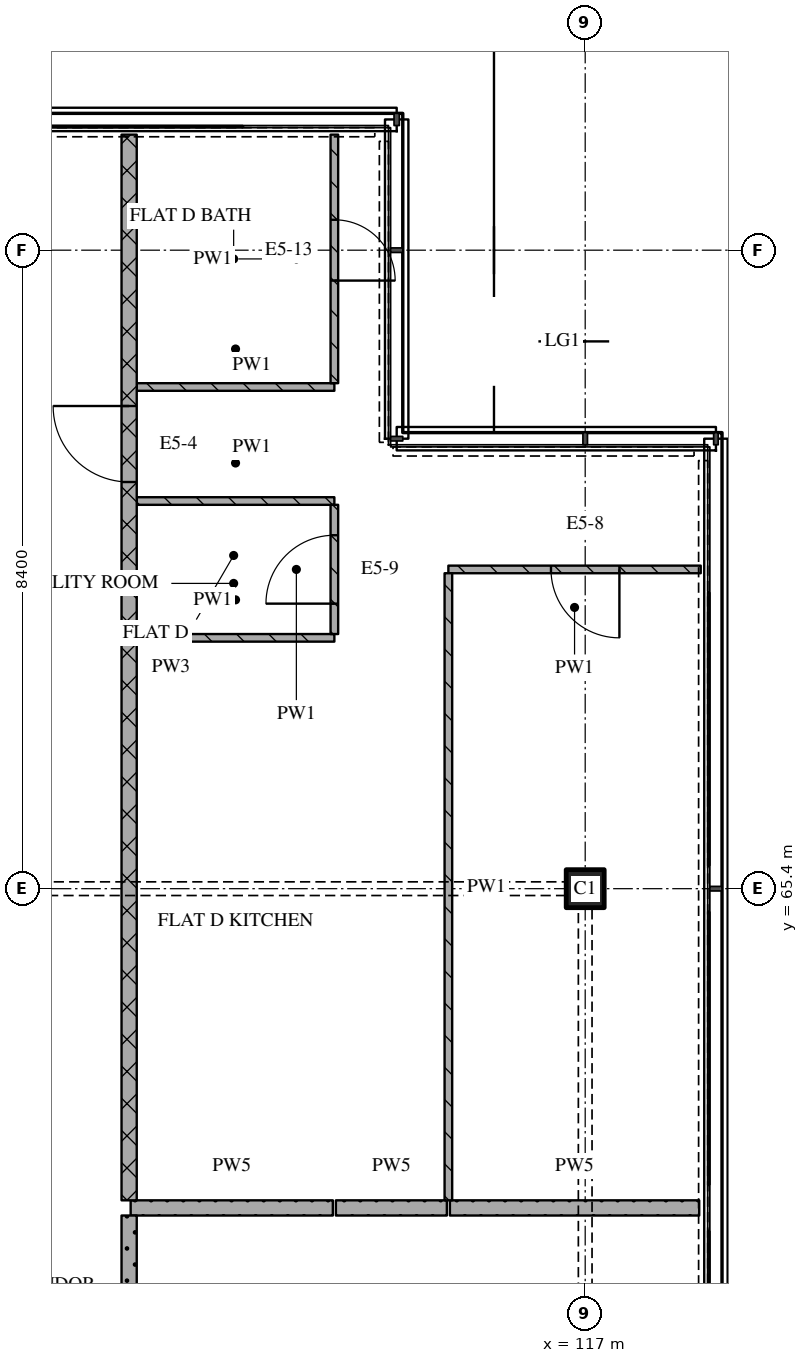
"""IFC4 building model, lengths in metres.
Left out: names, types, materials, properties, quantities, classifications, styles, units other than length and angle.
Written with IfcOpenShell. Run it as: python <this file> out.ifc"""

import sys

from ifc_helpers import new_model, si_unit, direction, frame, frame_2d, origin, origin_2d, place, context, subcontext, project, spatial, rectangle, extrude, element, fill, save


model = new_model("IFC4")
c1 = context("Model", 3, precision=1e-05, world=origin(), true_north=direction((0.0, 1.0)))
c2 = subcontext(c1, "Body", "Model", "MODEL_VIEW")
j1 = project(units=[si_unit("LENGTHUNIT", "METRE"), si_unit("PLANEANGLEUNIT", "RADIAN")], contexts=[c1])
p1 = place(None, origin())
s1 = spatial("IfcSite", under=j1, at=p1, CompositionType="ELEMENT")
p2 = place(p1, origin())
s2 = spatial("IfcBuilding", under=s1, at=p2, CompositionType="ELEMENT")
p3 = place(p2, frame((0.0, 0.0, 295.95)))
s3 = spatial("IfcBuildingStorey", under=s2, at=p3, CompositionType="ELEMENT", Elevation=295.95)
p4 = place(p3, frame((117.0, 65.4, 0.0), z_axis=(0.0, 0.0, 1.0), x_axis=(1.0, 0.0, 0.0)))
e1 = element("IfcColumn", 1, at=p4, inside=s3, PredefinedType="COLUMN", context=c2, shape_type="SweptSolid", body=[
    extrude(rectangle(XDim=0.5, YDim=0.5, at=origin_2d()), origin(), (0.0, 0.0, 1.0), 3.6),
])
p5 = place(p3, frame((111.02, 61.2, 0.0), z_axis=(0.0, 0.0, 1.0), x_axis=(1.0, 0.0, 0.0)))
e2 = element("IfcWall", 2, at=p5, inside=s3, PredefinedType="PARTITIONING", context=c2, shape_type="SweptSolid", body=[
    extrude(rectangle(XDim=2.66, YDim=0.2, at=frame_2d((1.33, 0.0))), origin(), (0.0, 0.0, 1.0), 3.32),
])
p6 = place(p3, frame((113.72, 61.2, 0.0), z_axis=(0.0, 0.0, 1.0), x_axis=(1.0, 0.0, 0.0)))
e3 = element("IfcWall", 3, at=p6, inside=s3, PredefinedType="PARTITIONING", context=c2, shape_type="SweptSolid", body=[
    extrude(rectangle(XDim=1.46, YDim=0.2, at=frame_2d((0.73, 0.0))), origin(), (0.0, 0.0, 1.0), 3.32),
])
p7 = place(p3, frame((115.22, 61.2, 0.0), z_axis=(0.0, 0.0, 1.0), x_axis=(1.0, 0.0, 0.0)))
e4 = element("IfcWall", 4, at=p7, inside=s3, PredefinedType="PARTITIONING", context=c2, shape_type="SweptSolid", body=[
    extrude(rectangle(XDim=3.28, YDim=0.2, at=frame_2d((1.64, 0.0))), origin(), (0.0, 0.0, 1.0), 3.32),
])
p8 = place(p3, frame((111.1, 68.7, 0.0), z_axis=(0.0, 0.0, 1.0), x_axis=(1.0, 0.0, 0.0)))
e5 = element("IfcWall", 5, at=p8, inside=s3, PredefinedType="PARTITIONING", context=c2, shape_type="SweptSolid", body=[
    extrude(rectangle(XDim=2.6, YDim=0.1, at=frame_2d((1.3, 0.0))), origin(), (0.0, 0.0, 1.0), 3.32),
])
p9 = place(p3, frame((118.52, 69.6, 0.0), z_axis=(0.0, 0.0, 1.0), x_axis=(-1.0, 0.0, 0.0)))
e6 = element("IfcWall", 6, at=p9, inside=s3, PredefinedType="PARTITIONING", context=c2, shape_type="SweptSolid", body=[
    extrude(rectangle(XDim=3.32, YDim=0.1, at=frame_2d((1.66, 0.0))), origin(), (0.0, 0.0, 1.0), 3.32),
])
p10 = place(p9, frame((1.07, 0.0, 0.0)))
e7 = element("IfcOpeningElement", 7, at=p10, cuts=e6, PredefinedType="OPENING", context=c2, shape_type="SweptSolid", body=[
    extrude(rectangle(XDim=0.9, YDim=2.1, at=frame_2d((0.45, 1.05))), frame((0.0, 0.06, 0.0), z_axis=(0.0, -1.0, 0.0), x_axis=(1.0, 0.0, 0.0)), (0.0, 0.0, 1.0), 0.12),
])
for number, where, z_axis, x_axis in (
    (8, (111.1, 70.5, 0.0), (0.0, 0.0, 1.0), (1.0, 0.0, 0.0)),
    (9, (111.1, 72.0, 0.0), (0.0, 0.0, 1.0), (1.0, 0.0, 0.0)),
):
    element("IfcWall", number, at=place(p3, frame(where, z_axis=z_axis, x_axis=x_axis)), inside=s3, PredefinedType="PARTITIONING", context=c2, shape_type="SweptSolid", body=[
        extrude(rectangle(XDim=2.6, YDim=0.1, at=frame_2d((1.3, 0.0))), origin(), (0.0, 0.0, 1.0), 3.32),
    ])
p11 = place(p3, frame((111.0, 75.32, 0.0), z_axis=(0.0, 0.0, 1.0), x_axis=(0.0, -1.0, 0.0)))
e10 = element("IfcWall", 10, at=p11, inside=s3, PredefinedType="PARTITIONING", context=c2, shape_type="SweptSolid", body=[
    extrude(rectangle(XDim=14.02, YDim=0.2, at=frame_2d((7.01, 0.0))), origin(), (0.0, 0.0, 1.0), 3.32),
])
p12 = place(p11, frame((3.57, 0.0, 0.0)))
e11 = element("IfcOpeningElement", 11, at=p12, cuts=e10, PredefinedType="OPENING", context=c2, shape_type="SweptSolid", body=[
    extrude(rectangle(XDim=1.0, YDim=2.1, at=frame_2d((0.5, 1.05))), frame((0.0, 0.11, 0.0), z_axis=(0.0, -1.0, 0.0), x_axis=(1.0, 0.0, 0.0)), (0.0, 0.0, 1.0), 0.22),
])
p13 = place(p3, frame((111.0, 61.1, 0.0), z_axis=(0.0, 0.0, 1.0), x_axis=(0.0, -1.0, 0.0)))
e12 = element("IfcWall", 12, at=p13, inside=s3, PredefinedType="PARTITIONING", context=c2, shape_type="SweptSolid", body=[
    extrude(rectangle(XDim=2.2, YDim=0.2, at=frame_2d((1.1, 0.0))), origin(), (0.0, 0.0, 1.0), 3.32),
])
p14 = place(p3, frame((113.7, 68.75, 0.0), z_axis=(0.0, 0.0, 1.0), x_axis=(0.0, 1.0, 0.0)))
e13 = element("IfcWall", 13, at=p14, inside=s3, PredefinedType="PARTITIONING", context=c2, shape_type="SweptSolid", body=[
    extrude(rectangle(XDim=1.7, YDim=0.1, at=frame_2d((0.85, 0.0))), origin(), (0.0, 0.0, 1.0), 3.32),
])
p15 = place(p14, frame((0.4, 0.0, 0.0)))
e14 = element("IfcOpeningElement", 14, at=p15, cuts=e13, PredefinedType="OPENING", context=c2, shape_type="SweptSolid", body=[
    extrude(rectangle(XDim=0.9, YDim=2.1, at=frame_2d((0.45, 1.05))), frame((0.0, 0.06, 0.0), z_axis=(0.0, -1.0, 0.0), x_axis=(1.0, 0.0, 0.0)), (0.0, 0.0, 1.0), 0.12),
])
p16 = place(p3, frame((113.7, 72.05, 0.0), z_axis=(0.0, 0.0, 1.0), x_axis=(0.0, 1.0, 0.0)))
e15 = element("IfcWall", 15, at=p16, inside=s3, PredefinedType="PARTITIONING", context=c2, shape_type="SweptSolid", body=[
    extrude(rectangle(XDim=3.27, YDim=0.1, at=frame_2d((1.635, 0.0))), origin(), (0.0, 0.0, 1.0), 3.32),
])
p17 = place(p16, frame((1.35, 0.0, 0.0)))
e16 = element("IfcOpeningElement", 16, at=p17, cuts=e15, PredefinedType="OPENING", context=c2, shape_type="SweptSolid", body=[
    extrude(rectangle(XDim=0.8, YDim=2.1, at=frame_2d((0.4, 1.05))), frame((0.0, 0.06, 0.0), z_axis=(0.0, -1.0, 0.0), x_axis=(1.0, 0.0, 0.0)), (0.0, 0.0, 1.0), 0.12),
])
p18 = place(p3, frame((115.2, 69.55, 0.0), z_axis=(0.0, 0.0, 1.0), x_axis=(0.0, -1.0, 0.0)))
e17 = element("IfcWall", 17, at=p18, inside=s3, PredefinedType="PARTITIONING", context=c2, shape_type="SweptSolid", body=[
    extrude(rectangle(XDim=8.25, YDim=0.1, at=frame_2d((4.125, 0.0))), origin(), (0.0, 0.0, 1.0), 3.32),
])
p19 = place(p10, origin())
e18 = element("IfcDoor", 18, at=p19, inside=s3, OperationType="SINGLE_SWING_LEFT", PredefinedType="DOOR", context=c2, shape_type="SweptSolid", body=[
    extrude(rectangle(XDim=0.9, YDim=2.1, at=frame_2d((0.45, 1.05))), frame((0.0, 0.025, 0.0), z_axis=(0.0, -1.0, 0.0), x_axis=(1.0, 0.0, 0.0)), (0.0, 0.0, 1.0), 0.05),
])
fill(e7, e18)
p20 = place(p12, origin())
e19 = element("IfcDoor", 19, at=p20, inside=s3, OperationType="SINGLE_SWING_RIGHT", PredefinedType="DOOR", context=c2, shape_type="SweptSolid", body=[
    extrude(rectangle(XDim=1.0, YDim=2.1, at=frame_2d((0.5, 1.05))), frame((0.0, 0.025, 0.0), z_axis=(0.0, -1.0, 0.0), x_axis=(1.0, 0.0, 0.0)), (0.0, 0.0, 1.0), 0.05),
])
fill(e11, e19)
p21 = place(p15, origin())
e20 = element("IfcDoor", 20, at=p21, inside=s3, OperationType="SINGLE_SWING_LEFT", PredefinedType="DOOR", context=c2, shape_type="SweptSolid", body=[
    extrude(rectangle(XDim=0.9, YDim=2.1, at=frame_2d((0.45, 1.05))), frame((0.0, 0.025, 0.0), z_axis=(0.0, -1.0, 0.0), x_axis=(1.0, 0.0, 0.0)), (0.0, 0.0, 1.0), 0.05),
])
fill(e14, e20)
p22 = place(p17, origin())
e21 = element("IfcDoor", 21, at=p22, inside=s3, OperationType="SINGLE_SWING_RIGHT", PredefinedType="DOOR", context=c2, shape_type="SweptSolid", body=[
    extrude(rectangle(XDim=0.8, YDim=2.1, at=frame_2d((0.4, 1.05))), frame((0.0, 0.025, 0.0), z_axis=(0.0, -1.0, 0.0), x_axis=(1.0, 0.0, 0.0)), (0.0, 0.0, 1.0), 0.05),
])
fill(e16, e21)
save(model, sys.argv[1])
